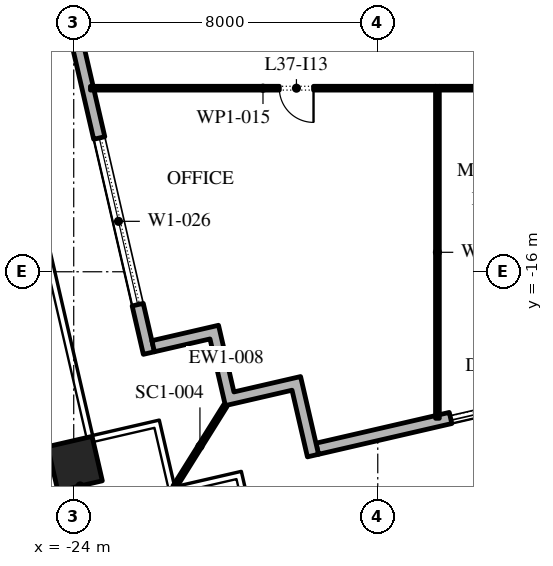
"""IFC4 building model, lengths in metres.
Left out: names, types, materials, properties, quantities, classifications, styles, units other than length and angle.
Written with IfcOpenShell. Run it as: python <this file> out.ifc"""

import sys

from ifc_helpers import new_model, si_unit, direction, frame, frame_2d, origin, origin_2d, place, context, subcontext, project, spatial, polyline, rectangle, outline, extrude, element, fill, save


model = new_model("IFC4")
c1 = context("Model", 3, precision=1e-05, world=origin(), true_north=direction((0.0, 1.0)))
c2 = subcontext(c1, "Body", "Model", "MODEL_VIEW")
j1 = project(units=[si_unit("LENGTHUNIT", "METRE"), si_unit("PLANEANGLEUNIT", "RADIAN")], contexts=[c1])
p1 = place(None, origin())
s1 = spatial("IfcSite", under=j1, at=p1, CompositionType="ELEMENT")
p2 = place(p1, origin())
s2 = spatial("IfcBuilding", under=s1, at=p2, CompositionType="ELEMENT")
p3 = place(p2, frame((0.0, 0.0, 171.6)))
s3 = spatial("IfcBuildingStorey", under=s2, at=p3, CompositionType="ELEMENT", Elevation=171.6)
p4 = place(p3, frame((-23.967, -21.051, 0.0), z_axis=(0.0, 0.0, 1.0), x_axis=(0.974370064785, 0.224951054344, 0.0)))
e1 = element("IfcColumn", 1, at=p4, inside=s3, PredefinedType="COLUMN", context=c2, shape_type="SweptSolid", body=[
    extrude(rectangle(XDim=1.2, YDim=1.2, at=origin_2d()), origin(), (0.0, 0.0, 1.0), 4.2),
])
p5 = place(p3, frame((-17.592, -20.657, 0.0), z_axis=(0.0, 0.0, 1.0), x_axis=(0.974370243697, 0.224950279389, 0.0)))
e2 = element("IfcWall", 2, at=p5, inside=s3, PredefinedType="STANDARD", context=c2, shape_type="SweptSolid", body=[
    extrude(rectangle(XDim=49.5, YDim=0.3, at=frame_2d((24.75, 0.0))), origin(), (0.0, 0.0, 1.0), 4.0),
])
p6 = place(p5, frame((3.6, 0.0, 0.0)))
e3 = element("IfcOpeningElement", 3, at=p6, cuts=e2, PredefinedType="OPENING", context=c2, shape_type="SweptSolid", body=[
    extrude(rectangle(XDim=2.4, YDim=3.5, at=frame_2d((1.2, 1.75))), frame((0.0, 0.16, 0.0), z_axis=(0.0, -1.0, 0.0), x_axis=(1.0, 0.0, 0.0)), (0.0, 0.0, 1.0), 0.32),
])
p7 = place(p5, frame((9.9, 0.0, 0.45)))
e4 = element("IfcOpeningElement", 4, at=p7, cuts=e2, PredefinedType="OPENING", context=c2, shape_type="SweptSolid", body=[
    extrude(rectangle(XDim=4.5, YDim=2.575, at=frame_2d((2.25, 1.288))), frame((0.0, 0.16, 0.0), z_axis=(0.0, -1.0, 0.0), x_axis=(1.0, 0.0, 0.0)), (0.0, 0.0, 1.0), 0.32),
])
p8 = place(p5, frame((18.2, 0.0, 0.45)))
e5 = element("IfcOpeningElement", 5, at=p8, cuts=e2, PredefinedType="OPENING", context=c2, shape_type="SweptSolid", body=[
    extrude(rectangle(XDim=4.5, YDim=3.05, at=frame_2d((2.25, 1.525))), frame((0.0, 0.16, 0.0), z_axis=(0.0, -1.0, 0.0), x_axis=(1.0, 0.0, 0.0)), (0.0, 0.0, 1.0), 0.32),
])
p9 = place(p5, frame((26.5, 0.0, 0.45)))
e6 = element("IfcOpeningElement", 6, at=p9, cuts=e2, PredefinedType="OPENING", context=c2, shape_type="SweptSolid", body=[
    extrude(rectangle(XDim=4.5, YDim=2.75, at=frame_2d((2.25, 1.375))), frame((0.0, 0.16, 0.0), z_axis=(0.0, -1.0, 0.0), x_axis=(1.0, 0.0, 0.0)), (0.0, 0.0, 1.0), 0.32),
])
p10 = place(p5, frame((36.8, 0.0, 0.0)))
e7 = element("IfcOpeningElement", 7, at=p10, cuts=e2, PredefinedType="OPENING", context=c2, shape_type="SweptSolid", body=[
    extrude(rectangle(XDim=2.4, YDim=3.275, at=frame_2d((1.2, 1.637))), frame((0.0, 0.16, 0.0), z_axis=(0.0, -1.0, 0.0), x_axis=(1.0, 0.0, 0.0)), (0.0, 0.0, 1.0), 0.32),
])
p11 = place(p5, frame((43.1, 0.0, 0.45)))
e8 = element("IfcOpeningElement", 8, at=p11, cuts=e2, PredefinedType="OPENING", context=c2, shape_type="SweptSolid", body=[
    extrude(rectangle(XDim=4.5, YDim=2.875, at=frame_2d((2.25, 1.438))), frame((0.0, 0.16, 0.0), z_axis=(0.0, -1.0, 0.0), x_axis=(1.0, 0.0, 0.0)), (0.0, 0.0, 1.0), 0.32),
])
p12 = place(p3, frame((-33.157, 30.092, 0.0), z_axis=(0.0, 0.0, 1.0), x_axis=(0.224950279389, -0.974370243697, 0.0)))
e9 = element("IfcWall", 9, at=p12, inside=s3, PredefinedType="STANDARD", context=c2, shape_type="SweptSolid", body=[
    extrude(rectangle(XDim=49.5, YDim=0.3, at=frame_2d((24.75, 0.0))), origin(), (0.0, 0.0, 1.0), 4.0),
])
p13 = place(p12, frame((2.207, 0.0, 0.0)))
e10 = element("IfcOpeningElement", 10, at=p13, cuts=e9, PredefinedType="OPENING", context=c2, shape_type="SweptSolid", body=[
    extrude(rectangle(XDim=2.4, YDim=3.5, at=frame_2d((1.2, 1.75))), frame((0.0, 0.16, 0.0), z_axis=(0.0, -1.0, 0.0), x_axis=(1.0, 0.0, 0.0)), (0.0, 0.0, 1.0), 0.32),
])
p14 = place(p12, frame((8.121, 0.0, 0.45)))
e11 = element("IfcOpeningElement", 11, at=p14, cuts=e9, PredefinedType="OPENING", context=c2, shape_type="SweptSolid", body=[
    extrude(rectangle(XDim=4.5, YDim=2.825, at=frame_2d((2.25, 1.413))), frame((0.0, 0.16, 0.0), z_axis=(0.0, -1.0, 0.0), x_axis=(1.0, 0.0, 0.0)), (0.0, 0.0, 1.0), 0.32),
])
p15 = place(p12, frame((15.236, 0.0, 0.45)))
e12 = element("IfcOpeningElement", 12, at=p15, cuts=e9, PredefinedType="OPENING", context=c2, shape_type="SweptSolid", body=[
    extrude(rectangle(XDim=4.5, YDim=2.95, at=frame_2d((2.25, 1.475))), frame((0.0, 0.16, 0.0), z_axis=(0.0, -1.0, 0.0), x_axis=(1.0, 0.0, 0.0)), (0.0, 0.0, 1.0), 0.32),
])
p16 = place(p12, frame((22.35, 0.0, 0.45)))
e13 = element("IfcOpeningElement", 13, at=p16, cuts=e9, PredefinedType="OPENING", context=c2, shape_type="SweptSolid", body=[
    extrude(rectangle(XDim=4.5, YDim=3.0, at=frame_2d((2.25, 1.5))), frame((0.0, 0.16, 0.0), z_axis=(0.0, -1.0, 0.0), x_axis=(1.0, 0.0, 0.0)), (0.0, 0.0, 1.0), 0.32),
])
p17 = place(p12, frame((30.514, 0.0, 0.0)))
e14 = element("IfcOpeningElement", 14, at=p17, cuts=e9, PredefinedType="OPENING", context=c2, shape_type="SweptSolid", body=[
    extrude(rectangle(XDim=2.4, YDim=3.5, at=frame_2d((1.2, 1.75))), frame((0.0, 0.16, 0.0), z_axis=(0.0, -1.0, 0.0), x_axis=(1.0, 0.0, 0.0)), (0.0, 0.0, 1.0), 0.32),
])
p18 = place(p12, frame((36.579, 0.0, 0.45)))
e15 = element("IfcOpeningElement", 15, at=p18, cuts=e9, PredefinedType="OPENING", context=c2, shape_type="SweptSolid", body=[
    extrude(rectangle(XDim=4.5, YDim=3.05, at=frame_2d((2.25, 1.525))), frame((0.0, 0.16, 0.0), z_axis=(0.0, -1.0, 0.0), x_axis=(1.0, 0.0, 0.0)), (0.0, 0.0, 1.0), 0.32),
])
p19 = place(p12, frame((43.693, 0.0, 0.45)))
e16 = element("IfcOpeningElement", 16, at=p19, cuts=e9, PredefinedType="OPENING", context=c2, shape_type="SweptSolid", body=[
    extrude(rectangle(XDim=4.5, YDim=3.05, at=frame_2d((2.25, 1.525))), frame((0.0, 0.16, 0.0), z_axis=(0.0, -1.0, 0.0), x_axis=(1.0, 0.0, 0.0)), (0.0, 0.0, 1.0), 0.32),
])
p20 = place(p3, origin())
e17 = element("IfcWall", 17, at=p20, inside=s3, PredefinedType="STANDARD", context=c2, shape_type="SweptSolid", body=[
    extrude(outline(polyline([(-18.256, -19.117), (-20.01, -19.522), (-20.414, -17.768), (-21.876, -18.105), (-21.943, -17.813), (-20.19, -17.408), (-19.785, -19.162), (-18.031, -18.757), (-17.558, -20.803), (-17.851, -20.871), (-18.256, -19.117)])), origin(), (0.0, 0.0, 1.0), 4.0),
])
p21 = place(p3, frame((-20.01, -19.522, -0.05), z_axis=(0.0, 0.0, 1.0), x_axis=(-0.529920736377, -0.848047176257, 0.0)))
e18 = element("IfcWall", 18, at=p21, inside=s3, PredefinedType="STANDARD", context=c2, shape_type="SweptSolid", body=[
    extrude(rectangle(XDim=2.526, YDim=0.1, at=frame_2d((1.263, 0.0))), origin(), (0.0, 0.0, 1.0), 4.05),
])
p22 = place(p3, frame((-14.43, -19.856, 0.0), z_axis=(0.0, 0.0, 1.0), x_axis=(0.0, 1.0, 0.0)))
e19 = element("IfcWall", 19, at=p22, inside=s3, PredefinedType="PARTITIONING", context=c2, shape_type="SweptSolid", body=[
    extrude(rectangle(XDim=8.736, YDim=0.1, at=frame_2d((4.368, 0.0))), origin(), (0.0, 0.0, 1.0), 4.0),
])
p23 = place(p3, frame((-14.48, -11.17, 0.0), z_axis=(0.0, 0.0, 1.0), x_axis=(-1.0, 0.0, 0.0)))
e20 = element("IfcWall", 20, at=p23, inside=s3, PredefinedType="PARTITIONING", context=c2, shape_type="SweptSolid", body=[
    extrude(rectangle(XDim=9.08, YDim=0.1, at=frame_2d((4.54, 0.0))), origin(), (0.0, 0.0, 1.0), 4.0),
])
p24 = place(p23, frame((3.21, 0.0, 0.0)))
e21 = element("IfcOpeningElement", 21, at=p24, cuts=e20, PredefinedType="OPENING", context=c2, shape_type="SweptSolid", body=[
    extrude(rectangle(XDim=0.9, YDim=2.1, at=frame_2d((0.45, 1.05))), frame((0.0, 0.06, 0.0), z_axis=(0.0, -1.0, 0.0), x_axis=(1.0, 0.0, 0.0)), (0.0, 0.0, 1.0), 0.12),
])
p25 = place(p3, frame((-9.88, -11.17, 0.0), z_axis=(0.0, 0.0, 1.0), x_axis=(-1.0, 0.0, 0.0)))
e22 = element("IfcWall", 22, at=p25, inside=s3, PredefinedType="PARTITIONING", context=c2, shape_type="SweptSolid", body=[
    extrude(rectangle(XDim=4.5, YDim=0.1, at=frame_2d((2.25, 0.0))), origin(), (0.0, 0.0, 1.0), 4.0),
])
p26 = place(p6, origin())
e23 = element("IfcDoor", 23, at=p26, inside=s3, OperationType="DOUBLE_DOOR_SLIDING", PredefinedType="DOOR", context=c2, shape_type="SweptSolid", body=[
    extrude(rectangle(XDim=2.4, YDim=3.5, at=frame_2d((1.2, 1.75))), frame((0.0, 0.025, 0.0), z_axis=(0.0, -1.0, 0.0), x_axis=(1.0, 0.0, 0.0)), (0.0, 0.0, 1.0), 0.05),
])
fill(e3, e23)
p27 = place(p19, origin())
e24 = element("IfcWindow", 24, at=p27, inside=s3, PartitioningType="DOUBLE_PANEL_VERTICAL", PredefinedType="WINDOW", context=c2, shape_type="SweptSolid", body=[
    extrude(rectangle(XDim=4.5, YDim=3.05, at=frame_2d((2.25, 1.525))), frame((0.0, 0.03, 0.0), z_axis=(0.0, -1.0, 0.0), x_axis=(1.0, 0.0, 0.0)), (0.0, 0.0, 1.0), 0.06),
])
fill(e16, e24)
p28 = place(p24, origin())
e25 = element("IfcDoor", 25, at=p28, inside=s3, OperationType="SINGLE_SWING_RIGHT", PredefinedType="DOOR", context=c2, shape_type="SweptSolid", body=[
    extrude(rectangle(XDim=0.9, YDim=2.1, at=frame_2d((0.45, 1.05))), frame((0.0, 0.025, 0.0), z_axis=(0.0, -1.0, 0.0), x_axis=(1.0, 0.0, 0.0)), (0.0, 0.0, 1.0), 0.05),
])
fill(e21, e25)
save(model, sys.argv[1])
